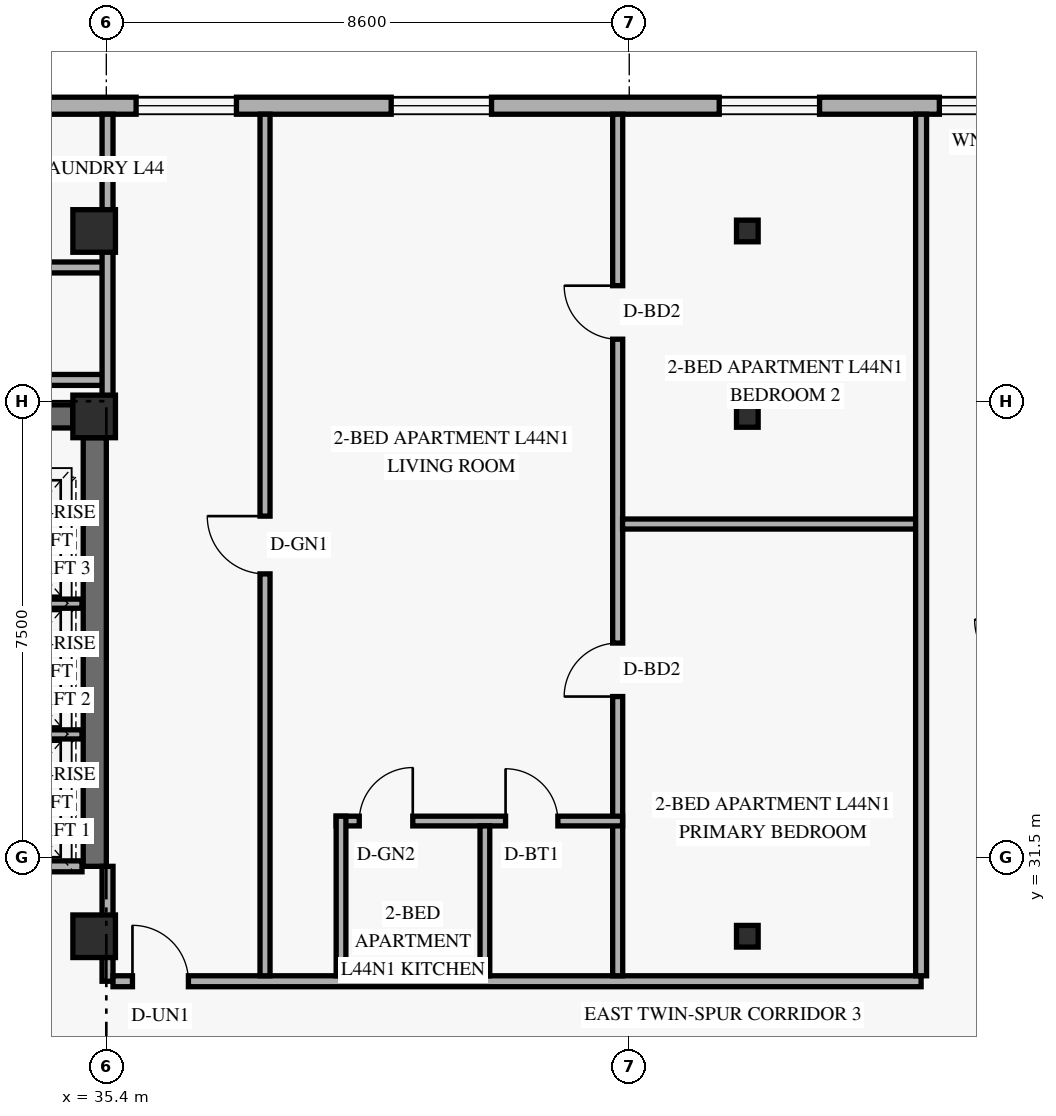
"""IFC4 building model, lengths in metres.
Left out: names, types, materials, properties, quantities, classifications, styles, units other than length and angle.
Written with IfcOpenShell. Run it as: python <this file> out.ifc"""

import sys

from ifc_helpers import new_model, si_unit, direction, frame, frame_2d, origin, origin_2d, place, context, subcontext, project, spatial, rectangle, hollow_rectangle, extrude, element, fill, save


model = new_model("IFC4")
c1 = context("Model", 3, precision=1e-05, world=origin(), true_north=direction((0.0, 1.0)))
c2 = subcontext(c1, "Body", "Model", "MODEL_VIEW")
j1 = project(units=[si_unit("LENGTHUNIT", "METRE"), si_unit("PLANEANGLEUNIT", "RADIAN")], contexts=[c1])
p1 = place(None, origin())
s1 = spatial("IfcSite", under=j1, at=p1, CompositionType="ELEMENT")
p2 = place(p1, origin())
s2 = spatial("IfcBuilding", under=s1, at=p2, CompositionType="ELEMENT")
p3 = place(p2, frame((0.0, 0.0, 169.8)))
s3 = spatial("IfcBuildingStorey", under=s2, at=p3, CompositionType="ELEMENT", Elevation=169.8)
p4 = place(p3, frame((35.21, 31.35, 0.0), z_axis=(0.0, 0.0, 1.0), x_axis=(0.0, 1.0, 0.0)))
e1 = element("IfcWall", 1, at=p4, inside=s3, PredefinedType="SHEAR", context=c2, shape_type="SweptSolid", body=[
    extrude(rectangle(XDim=7.05, YDim=0.38, at=frame_2d((3.525, 0.0))), origin(), (0.0, 0.0, 1.0), 2.738),
])
p5 = place(p3, frame((24.55, 38.75, 0.0), z_axis=(0.0, 0.0, 1.0), x_axis=(1.0, 0.0, 0.0)))
e2 = element("IfcWall", 2, at=p5, inside=s3, PredefinedType="SHEAR", context=c2, shape_type="SweptSolid", body=[
    extrude(rectangle(XDim=10.3, YDim=0.38, at=frame_2d((5.15, 0.0))), origin(), (0.0, 0.0, 1.0), 3.35),
])
p6 = place(p5, frame((5.2, 0.0, 0.0)))
e3 = element("IfcOpeningElement", 3, at=p6, cuts=e2, PredefinedType="OPENING", context=c2, shape_type="SweptSolid", body=[
    extrude(rectangle(XDim=1.05, YDim=2.15, at=frame_2d((0.525, 1.075))), frame((0.0, 0.2, 0.0), z_axis=(0.0, -1.0, 0.0), x_axis=(1.0, 0.0, 0.0)), (0.0, 0.0, 1.0), 0.4),
])
for number, where, z_axis, x_axis in (
    (4, (35.2, 30.2, 0.0), (0.0, 0.0, 1.0), (1.0, 0.0, 0.0)),
    (5, (35.2, 38.75, 0.0), (0.0, 0.0, 1.0), (1.0, 0.0, 0.0)),
    (6, (35.2, 41.8, 0.0), (0.0, 0.0, 1.0), (1.0, 0.0, 0.0)),
):
    element("IfcColumn", number, at=place(p3, frame(where, z_axis=z_axis, x_axis=x_axis)), inside=s3, PredefinedType="COLUMN", context=c2, shape_type="SweptSolid", body=[
        extrude(rectangle(XDim=0.7, YDim=0.7, at=origin_2d()), origin(), (0.0, 0.0, 1.0), 3.6),
    ])
for number, where, z_axis, x_axis in (
    (7, (45.879, 30.2, 0.0), (0.035, 0.0, 0.999), (0.0, 1.0, 0.0)),
    (8, (45.879, 38.75, 0.0), (0.035, 0.0, 0.999), (0.0, 1.0, 0.0)),
    (9, (45.879, 41.8, 0.0), (0.035, 0.0, 0.999), (0.0, 1.0, 0.0)),
):
    element("IfcColumn", number, at=place(p3, frame(where, z_axis=z_axis, x_axis=x_axis)), inside=s3, PredefinedType="COLUMN", context=c2, shape_type="SweptSolid", body=[
        extrude(hollow_rectangle(XDim=0.356, YDim=0.356, WallThickness=0.016, at=origin_2d()), origin(), (0.0, 0.0, 1.0), 3.602),
    ])
p7 = place(p3, frame((54.98, 43.86, 0.0), z_axis=(0.0, 0.0, 1.0), x_axis=(-1.0, 0.0, 0.0)))
e10 = element("IfcWall", 10, at=p7, inside=s3, PredefinedType="SOLIDWALL", context=c2, shape_type="SweptSolid", body=[
    extrude(rectangle(XDim=33.76, YDim=0.28, at=frame_2d((16.88, 0.0))), origin(), (0.0, 0.0, 1.0), 3.35),
])
p8 = place(p7, frame((28.555, 0.0, 0.85)))
e11 = element("IfcOpeningElement", 11, at=p8, cuts=e10, PredefinedType="OPENING", context=c2, shape_type="SweptSolid", body=[
    extrude(rectangle(XDim=1.65, YDim=1.6, at=frame_2d((0.825, 0.8))), frame((0.0, 0.15, 0.0), z_axis=(0.0, -1.0, 0.0), x_axis=(1.0, 0.0, 0.0)), (0.0, 0.0, 1.0), 0.3),
])
p9 = place(p7, frame((21.67, 0.0, 0.85)))
e12 = element("IfcOpeningElement", 12, at=p9, cuts=e10, PredefinedType="OPENING", context=c2, shape_type="SweptSolid", body=[
    extrude(rectangle(XDim=1.65, YDim=1.6, at=frame_2d((0.825, 0.8))), frame((0.0, 0.15, 0.0), z_axis=(0.0, -1.0, 0.0), x_axis=(1.0, 0.0, 0.0)), (0.0, 0.0, 1.0), 0.3),
])
p10 = place(p7, frame((17.44, 0.0, 0.85)))
e13 = element("IfcOpeningElement", 13, at=p10, cuts=e10, PredefinedType="OPENING", context=c2, shape_type="SweptSolid", body=[
    extrude(rectangle(XDim=1.65, YDim=1.6, at=frame_2d((0.825, 0.8))), frame((0.0, 0.15, 0.0), z_axis=(0.0, -1.0, 0.0), x_axis=(1.0, 0.0, 0.0)), (0.0, 0.0, 1.0), 0.3),
])
p11 = place(p7, frame((13.245, 0.0, 0.85)))
e14 = element("IfcOpeningElement", 14, at=p11, cuts=e10, PredefinedType="OPENING", context=c2, shape_type="SweptSolid", body=[
    extrude(rectangle(XDim=1.65, YDim=1.6, at=frame_2d((0.825, 0.8))), frame((0.0, 0.15, 0.0), z_axis=(0.0, -1.0, 0.0), x_axis=(1.0, 0.0, 0.0)), (0.0, 0.0, 1.0), 0.3),
])
p12 = place(p7, frame((7.85, 0.0, 0.85)))
e15 = element("IfcOpeningElement", 15, at=p12, cuts=e10, PredefinedType="OPENING", context=c2, shape_type="SweptSolid", body=[
    extrude(rectangle(XDim=1.65, YDim=1.6, at=frame_2d((0.825, 0.8))), frame((0.0, 0.15, 0.0), z_axis=(0.0, -1.0, 0.0), x_axis=(1.0, 0.0, 0.0)), (0.0, 0.0, 1.0), 0.3),
])
p13 = place(p7, frame((4.68, 0.0, 0.85)))
e16 = element("IfcOpeningElement", 16, at=p13, cuts=e10, PredefinedType="OPENING", context=c2, shape_type="SweptSolid", body=[
    extrude(rectangle(XDim=1.2, YDim=1.5, at=frame_2d((0.6, 0.75))), frame((0.0, 0.15, 0.0), z_axis=(0.0, -1.0, 0.0), x_axis=(1.0, 0.0, 0.0)), (0.0, 0.0, 1.0), 0.3),
])
p14 = place(p7, frame((1.365, 0.0, 0.85)))
e17 = element("IfcOpeningElement", 17, at=p14, cuts=e10, PredefinedType="OPENING", context=c2, shape_type="SweptSolid", body=[
    extrude(rectangle(XDim=1.65, YDim=1.6, at=frame_2d((0.825, 0.8))), frame((0.0, 0.15, 0.0), z_axis=(0.0, -1.0, 0.0), x_axis=(1.0, 0.0, 0.0)), (0.0, 0.0, 1.0), 0.3),
])
p15 = place(p3, frame((32.74, 31.35, 0.0), z_axis=(0.0, 0.0, 1.0), x_axis=(1.0, 0.0, 0.0)))
e18 = element("IfcWall", 18, at=p15, inside=s3, PredefinedType="STANDARD", context=c2, shape_type="SweptSolid", body=[
    extrude(rectangle(XDim=2.26, YDim=0.18, at=frame_2d((1.13, 0.0))), origin(), (0.0, 0.0, 1.0), 3.35),
])
for number, where, z_axis, x_axis in (
    (19, (32.74, 33.52, 0.0), (0.0, 0.0, 1.0), (1.0, 0.0, 0.0)),
    (20, (32.74, 35.67, 0.0), (0.0, 0.0, 1.0), (1.0, 0.0, 0.0)),
):
    element("IfcWall", number, at=place(p3, frame(where, z_axis=z_axis, x_axis=x_axis)), inside=s3, PredefinedType="STANDARD", context=c2, shape_type="SweptSolid", body=[
        extrude(rectangle(XDim=2.26, YDim=0.15, at=frame_2d((1.13, 0.0))), origin(), (0.0, 0.0, 1.0), 3.35),
    ])
p16 = place(p3, frame((35.42, 29.46, 0.0), z_axis=(0.0, 0.0, 1.0), x_axis=(0.0, 1.0, 0.0)))
e21 = element("IfcWall", 21, at=p16, inside=s3, PredefinedType="STANDARD", context=c2, shape_type="SweptSolid", body=[
    extrude(rectangle(XDim=1.89, YDim=0.18, at=frame_2d((0.945, 0.0))), origin(), (0.0, 0.0, 1.0), 2.72),
])
p17 = place(p3, frame((35.51, 29.46, 0.0), z_axis=(0.0, 0.0, 1.0), x_axis=(1.0, 0.0, 0.0)))
e22 = element("IfcWall", 22, at=p17, inside=s3, PredefinedType="STANDARD", context=c2, shape_type="SweptSolid", body=[
    extrude(rectangle(XDim=13.29, YDim=0.18, at=frame_2d((6.645, 0.0))), origin(), (0.0, 0.0, 1.0), 2.72),
])
p18 = place(p17, frame((0.32, 0.0, 0.0)))
e23 = element("IfcOpeningElement", 23, at=p18, cuts=e22, PredefinedType="OPENING", context=c2, shape_type="SweptSolid", body=[
    extrude(rectangle(XDim=0.92, YDim=2.15, at=frame_2d((0.46, 1.075))), frame((0.0, 0.1, 0.0), z_axis=(0.0, -1.0, 0.0), x_axis=(1.0, 0.0, 0.0)), (0.0, 0.0, 1.0), 0.2),
])
p19 = place(p3, frame((21.74, 41.2, 0.0), z_axis=(0.0, 0.0, 1.0), x_axis=(1.0, 0.0, 0.0)))
e24 = element("IfcWall", 24, at=p19, inside=s3, PredefinedType="STANDARD", context=c2, shape_type="SweptSolid", body=[
    extrude(rectangle(XDim=13.68, YDim=0.18, at=frame_2d((6.84, 0.0))), origin(), (0.0, 0.0, 1.0), 2.72),
])
p20 = place(p19, frame((2.95, 0.0, 0.0)))
e25 = element("IfcOpeningElement", 25, at=p20, cuts=e24, PredefinedType="OPENING", context=c2, shape_type="SweptSolid", body=[
    extrude(rectangle(XDim=0.95, YDim=2.15, at=frame_2d((0.475, 1.075))), frame((0.0, 0.1, 0.0), z_axis=(0.0, -1.0, 0.0), x_axis=(1.0, 0.0, 0.0)), (0.0, 0.0, 1.0), 0.2),
])
p21 = place(p19, frame((10.11, 0.0, 0.0)))
e26 = element("IfcOpeningElement", 26, at=p21, cuts=e24, PredefinedType="OPENING", context=c2, shape_type="SweptSolid", body=[
    extrude(rectangle(XDim=0.95, YDim=2.15, at=frame_2d((0.475, 1.075))), frame((0.0, 0.1, 0.0), z_axis=(0.0, -1.0, 0.0), x_axis=(1.0, 0.0, 0.0)), (0.0, 0.0, 1.0), 0.2),
])
p22 = place(p3, frame((23.85, 39.35, 0.0), z_axis=(0.0, 0.0, 1.0), x_axis=(1.0, 0.0, 0.0)))
e27 = element("IfcWall", 27, at=p22, inside=s3, PredefinedType="STANDARD", context=c2, shape_type="SweptSolid", body=[
    extrude(rectangle(XDim=11.57, YDim=0.18, at=frame_2d((5.785, 0.0))), origin(), (0.0, 0.0, 1.0), 2.72),
])
p23 = place(p3, frame((35.42, 38.75, 0.0), z_axis=(0.0, 0.0, 1.0), x_axis=(0.0, 1.0, 0.0)))
e28 = element("IfcWall", 28, at=p23, inside=s3, PredefinedType="PARTITIONING", context=c2, shape_type="SweptSolid", body=[
    extrude(rectangle(XDim=4.97, YDim=0.18, at=frame_2d((2.485, 0.0))), origin(), (0.0, 0.0, 1.0), 2.72),
])
p24 = place(p3, frame((43.81, 29.55, 0.0), z_axis=(0.0, 0.0, 1.0), x_axis=(0.0, 1.0, 0.0)))
e29 = element("IfcWall", 29, at=p24, inside=s3, PredefinedType="PARTITIONING", context=c2, shape_type="SweptSolid", body=[
    extrude(rectangle(XDim=14.17, YDim=0.165, at=frame_2d((7.085, 0.0))), origin(), (0.0, 0.0, 1.0), 2.72),
])
p25 = place(p24, frame((4.593, 0.0, 0.0)))
e30 = element("IfcOpeningElement", 30, at=p25, cuts=e29, PredefinedType="OPENING", context=c2, shape_type="SweptSolid", body=[
    extrude(rectangle(XDim=0.88, YDim=2.14, at=frame_2d((0.44, 1.07))), frame((0.0, 0.093, 0.0), z_axis=(0.0, -1.0, 0.0), x_axis=(1.0, 0.0, 0.0)), (0.0, 0.0, 1.0), 0.185),
])
p26 = place(p24, frame((10.47, 0.0, 0.0)))
e31 = element("IfcOpeningElement", 31, at=p26, cuts=e29, PredefinedType="OPENING", context=c2, shape_type="SweptSolid", body=[
    extrude(rectangle(XDim=0.88, YDim=2.14, at=frame_2d((0.44, 1.07))), frame((0.0, 0.093, 0.0), z_axis=(0.0, -1.0, 0.0), x_axis=(1.0, 0.0, 0.0)), (0.0, 0.0, 1.0), 0.185),
])
p27 = place(p3, frame((39.18, 32.095, 0.0), z_axis=(0.0, 0.0, 1.0), x_axis=(1.0, 0.0, 0.0)))
e32 = element("IfcWall", 32, at=p27, inside=s3, PredefinedType="PLUMBINGWALL", context=c2, shape_type="SweptSolid", body=[
    extrude(rectangle(XDim=4.71, YDim=0.16, at=frame_2d((2.355, 0.0))), origin(), (0.0, 0.0, 1.0), 3.35),
])
p28 = place(p27, frame((0.38, 0.0, 0.0)))
e33 = element("IfcOpeningElement", 33, at=p28, cuts=e32, PredefinedType="OPENING", context=c2, shape_type="SweptSolid", body=[
    extrude(rectangle(XDim=0.88, YDim=2.12, at=frame_2d((0.44, 1.06))), frame((0.0, 0.09, 0.0), z_axis=(0.0, -1.0, 0.0), x_axis=(1.0, 0.0, 0.0)), (0.0, 0.0, 1.0), 0.18),
])
p29 = place(p27, frame((2.786, 0.0, 0.0)))
e34 = element("IfcOpeningElement", 34, at=p29, cuts=e32, PredefinedType="OPENING", context=c2, shape_type="SweptSolid", body=[
    extrude(rectangle(XDim=0.86, YDim=2.12, at=frame_2d((0.43, 1.06))), frame((0.0, 0.09, 0.0), z_axis=(0.0, -1.0, 0.0), x_axis=(1.0, 0.0, 0.0)), (0.0, 0.0, 1.0), 0.18),
])
p30 = place(p3, frame((39.26, 29.55, 0.0), z_axis=(0.0, 0.0, 1.0), x_axis=(0.0, 1.0, 0.0)))
e35 = element("IfcWall", 35, at=p30, inside=s3, PredefinedType="PLUMBINGWALL", context=c2, shape_type="SweptSolid", body=[
    extrude(rectangle(XDim=2.625, YDim=0.16, at=frame_2d((1.312, 0.0))), origin(), (0.0, 0.0, 1.0), 2.72),
])
p31 = place(p3, frame((41.626, 29.55, 0.0), z_axis=(0.0, 0.0, 1.0), x_axis=(0.0, 1.0, 0.0)))
e36 = element("IfcWall", 36, at=p31, inside=s3, PredefinedType="PLUMBINGWALL", context=c2, shape_type="SweptSolid", body=[
    extrude(rectangle(XDim=2.465, YDim=0.16, at=frame_2d((1.232, 0.0))), origin(), (0.0, 0.0, 1.0), 2.72),
])
p32 = place(p3, frame((38.01, 29.55, 0.0), z_axis=(0.0, 0.0, 1.0), x_axis=(0.0, 1.0, 0.0)))
e37 = element("IfcWall", 37, at=p32, inside=s3, PredefinedType="PARTITIONING", context=c2, shape_type="SweptSolid", body=[
    extrude(rectangle(XDim=14.17, YDim=0.165, at=frame_2d((7.085, 0.0))), origin(), (0.0, 0.0, 1.0), 2.72),
])
p33 = place(p32, frame((6.61, 0.0, 0.0)))
e38 = element("IfcOpeningElement", 38, at=p33, cuts=e37, PredefinedType="OPENING", context=c2, shape_type="SweptSolid", body=[
    extrude(rectangle(XDim=0.95, YDim=2.15, at=frame_2d((0.475, 1.075))), frame((0.0, 0.093, 0.0), z_axis=(0.0, -1.0, 0.0), x_axis=(1.0, 0.0, 0.0)), (0.0, 0.0, 1.0), 0.185),
])
p34 = place(p3, frame((43.89, 36.98, 0.0), z_axis=(0.0, 0.0, 1.0), x_axis=(1.0, 0.0, 0.0)))
e39 = element("IfcWall", 39, at=p34, inside=s3, PredefinedType="PARTITIONING", context=c2, shape_type="SweptSolid", body=[
    extrude(rectangle(XDim=4.82, YDim=0.165, at=frame_2d((2.41, 0.0))), origin(), (0.0, 0.0, 1.0), 2.72),
])
p35 = place(p3, frame((48.8, 29.55, 0.0), z_axis=(0.0, 0.0, 1.0), x_axis=(0.0, 1.0, 0.0)))
e40 = element("IfcWall", 40, at=p35, inside=s3, PredefinedType="STANDARD", context=c2, shape_type="SweptSolid", body=[
    extrude(rectangle(XDim=14.17, YDim=0.18, at=frame_2d((7.085, 0.0))), origin(), (0.0, 0.0, 1.0), 2.72),
])
p36 = place(p10, origin())
e41 = element("IfcWindow", 41, at=p36, inside=s3, PartitioningType="SINGLE_PANEL", PredefinedType="WINDOW", context=c2, shape_type="SweptSolid", body=[
    extrude(rectangle(XDim=1.65, YDim=1.6, at=frame_2d((0.825, 0.8))), frame((0.0, 0.03, 0.0), z_axis=(0.0, -1.0, 0.0), x_axis=(1.0, 0.0, 0.0)), (0.0, 0.0, 1.0), 0.06),
])
fill(e13, e41)
p37 = place(p11, origin())
e42 = element("IfcWindow", 42, at=p37, inside=s3, PartitioningType="SINGLE_PANEL", PredefinedType="WINDOW", context=c2, shape_type="SweptSolid", body=[
    extrude(rectangle(XDim=1.65, YDim=1.6, at=frame_2d((0.825, 0.8))), frame((0.0, 0.03, 0.0), z_axis=(0.0, -1.0, 0.0), x_axis=(1.0, 0.0, 0.0)), (0.0, 0.0, 1.0), 0.06),
])
fill(e14, e42)
p38 = place(p12, origin())
e43 = element("IfcWindow", 43, at=p38, inside=s3, PartitioningType="SINGLE_PANEL", PredefinedType="WINDOW", context=c2, shape_type="SweptSolid", body=[
    extrude(rectangle(XDim=1.65, YDim=1.6, at=frame_2d((0.825, 0.8))), frame((0.0, 0.03, 0.0), z_axis=(0.0, -1.0, 0.0), x_axis=(1.0, 0.0, 0.0)), (0.0, 0.0, 1.0), 0.06),
])
fill(e15, e43)
p39 = place(p13, origin())
e44 = element("IfcWindow", 44, at=p39, inside=s3, PartitioningType="SINGLE_PANEL", PredefinedType="WINDOW", context=c2, shape_type="SweptSolid", body=[
    extrude(rectangle(XDim=1.2, YDim=1.5, at=frame_2d((0.6, 0.75))), frame((0.0, 0.03, 0.0), z_axis=(0.0, -1.0, 0.0), x_axis=(1.0, 0.0, 0.0)), (0.0, 0.0, 1.0), 0.06),
])
fill(e16, e44)
p40 = place(p33, origin())
e45 = element("IfcDoor", 45, at=p40, inside=s3, OperationType="SINGLE_SWING_RIGHT", PredefinedType="DOOR", context=c2, shape_type="SweptSolid", body=[
    extrude(rectangle(XDim=0.95, YDim=2.15, at=frame_2d((0.475, 1.075))), frame((0.0, 0.025, 0.0), z_axis=(0.0, -1.0, 0.0), x_axis=(1.0, 0.0, 0.0)), (0.0, 0.0, 1.0), 0.05),
])
fill(e38, e45)
p41 = place(p18, origin())
e46 = element("IfcDoor", 46, at=p41, inside=s3, OperationType="SINGLE_SWING_LEFT", PredefinedType="DOOR", context=c2, shape_type="SweptSolid", body=[
    extrude(rectangle(XDim=0.92, YDim=2.15, at=frame_2d((0.46, 1.075))), frame((0.0, 0.025, 0.0), z_axis=(0.0, -1.0, 0.0), x_axis=(1.0, 0.0, 0.0)), (0.0, 0.0, 1.0), 0.05),
])
fill(e23, e46)
p42 = place(p28, origin())
e47 = element("IfcDoor", 47, at=p42, inside=s3, OperationType="SINGLE_SWING_RIGHT", PredefinedType="DOOR", context=c2, shape_type="SweptSolid", body=[
    extrude(rectangle(XDim=0.88, YDim=2.12, at=frame_2d((0.44, 1.06))), frame((0.0, 0.025, 0.0), z_axis=(0.0, -1.0, 0.0), x_axis=(1.0, 0.0, 0.0)), (0.0, 0.0, 1.0), 0.05),
])
fill(e33, e47)
p43 = place(p29, origin())
e48 = element("IfcDoor", 48, at=p43, inside=s3, OperationType="SINGLE_SWING_LEFT", PredefinedType="DOOR", context=c2, shape_type="SweptSolid", body=[
    extrude(rectangle(XDim=0.86, YDim=2.12, at=frame_2d((0.43, 1.06))), frame((0.0, 0.025, 0.0), z_axis=(0.0, -1.0, 0.0), x_axis=(1.0, 0.0, 0.0)), (0.0, 0.0, 1.0), 0.05),
])
fill(e34, e48)
p44 = place(p25, origin())
e49 = element("IfcDoor", 49, at=p44, inside=s3, OperationType="SINGLE_SWING_LEFT", PredefinedType="DOOR", context=c2, shape_type="SweptSolid", body=[
    extrude(rectangle(XDim=0.88, YDim=2.14, at=frame_2d((0.44, 1.07))), frame((0.0, 0.025, 0.0), z_axis=(0.0, -1.0, 0.0), x_axis=(1.0, 0.0, 0.0)), (0.0, 0.0, 1.0), 0.05),
])
fill(e30, e49)
p45 = place(p26, origin())
e50 = element("IfcDoor", 50, at=p45, inside=s3, OperationType="SINGLE_SWING_RIGHT", PredefinedType="DOOR", context=c2, shape_type="SweptSolid", body=[
    extrude(rectangle(XDim=0.88, YDim=2.14, at=frame_2d((0.44, 1.07))), frame((0.0, 0.025, 0.0), z_axis=(0.0, -1.0, 0.0), x_axis=(1.0, 0.0, 0.0)), (0.0, 0.0, 1.0), 0.05),
])
fill(e31, e50)
save(model, sys.argv[1])
